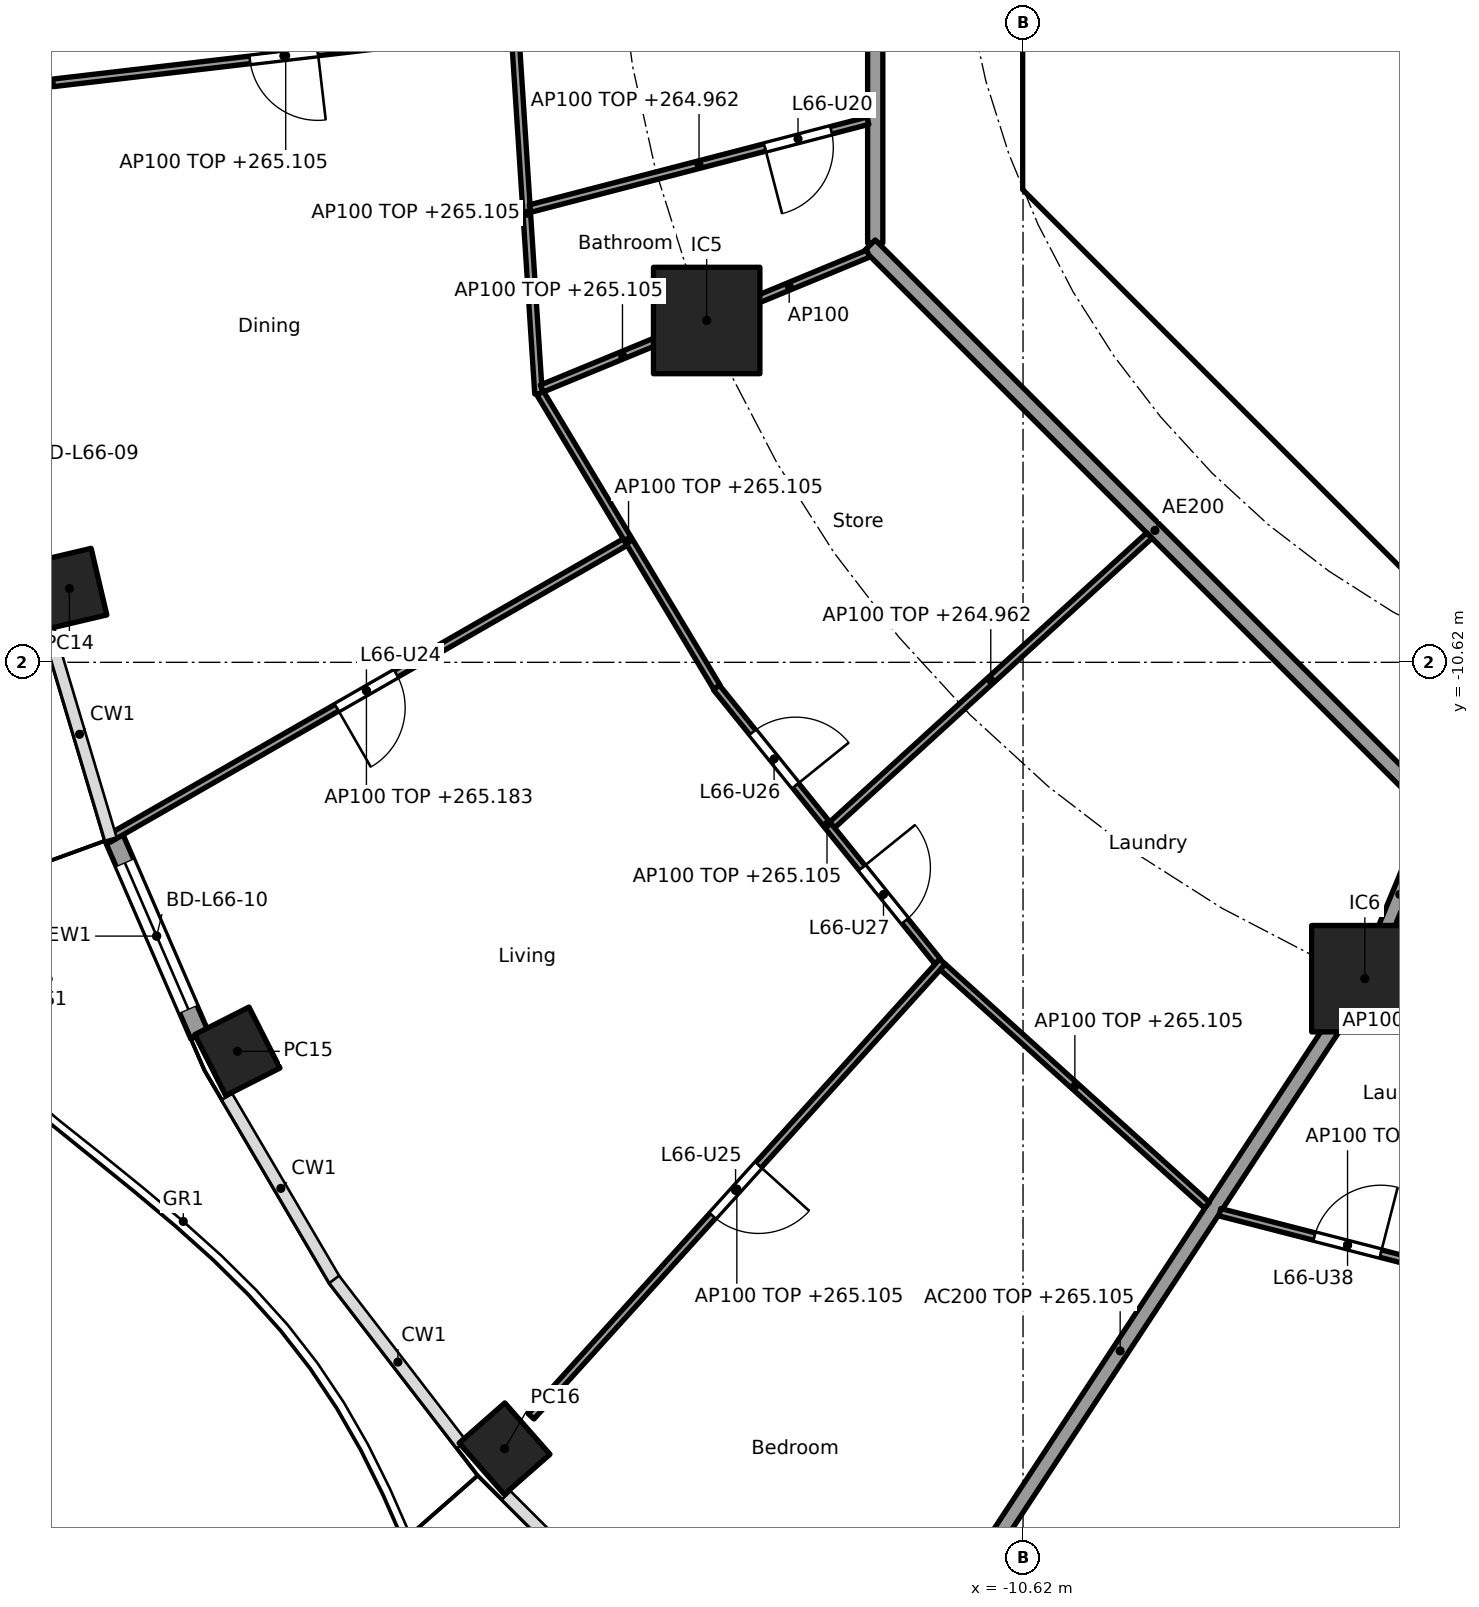
"""IFC4 building model, lengths in metres.
Left out: names, types, materials, properties, quantities, classifications, styles, units other than length and angle.
Written with IfcOpenShell. Run it as: python <this file> out.ifc"""

import sys

from ifc_helpers import new_model, si_unit, direction, frame, frame_2d, origin, origin_2d, place, context, subcontext, project, spatial, polyline, rectangle, hollow_rectangle, outline, extrude, element, fill, save


model = new_model("IFC4")
c1 = context("Model", 3, precision=1e-05, world=origin(), true_north=direction((0.0, 1.0)))
c2 = subcontext(c1, "Body", "Model", "MODEL_VIEW")
j1 = project(units=[si_unit("LENGTHUNIT", "METRE"), si_unit("PLANEANGLEUNIT", "RADIAN")], contexts=[c1])
p1 = place(None, origin())
s1 = spatial("IfcSite", under=j1, at=p1, CompositionType="ELEMENT")
p2 = place(p1, origin())
s2 = spatial("IfcBuilding", under=s1, at=p2, CompositionType="ELEMENT")
p3 = place(p2, frame((0.0, 0.0, 262.2)))
s3 = spatial("IfcBuildingStorey", under=s2, at=p3, CompositionType="ELEMENT", Elevation=262.2)
for number, where, z_axis, x_axis in (
    (1, (-23.166, -9.65, 0.0), (0.0, 0.0, 1.0), (0.229, -0.973, 0.0)),
    (2, (-20.957, -15.738, 0.0), (0.0, 0.0, 1.0), (0.452, -0.892, 0.0)),
    (3, (-17.441, -20.965, 0.0), (0.0, 0.0, 1.0), (0.66, -0.751, 0.0)),
):
    element("IfcColumn", number, at=place(p3, frame(where, z_axis=z_axis, x_axis=x_axis)), inside=s3, PredefinedType="COLUMN", context=c2, shape_type="SweptSolid", body=[
        extrude(hollow_rectangle(XDim=0.9, YDim=0.8, WallThickness=0.028, at=origin_2d()), origin(), (0.0, 0.0, 1.0), 3.7),
    ])
for number, where, z_axis, x_axis in (
    (4, (-14.782, -6.123, 0.0), (0.0, 0.0, 1.0), (1.0, 0.0, 0.0)),
    (5, (-6.123, -14.782, 0.0), (0.0, 0.0, 1.0), (1.0, 0.0, 0.0)),
):
    element("IfcColumn", number, at=place(p3, frame(where, z_axis=z_axis, x_axis=x_axis)), inside=s3, PredefinedType="COLUMN", context=c2, shape_type="SweptSolid", body=[
        extrude(rectangle(XDim=1.4, YDim=1.4, at=origin_2d()), origin(), (0.0, 0.0, 1.0), 3.7),
    ])
p4 = place(p3, frame((-21.454, -15.525, 0.0), z_axis=(0.0, 0.0, 1.0), x_axis=(-0.397597791596, 0.9175598052, 0.0)))
e6 = element("IfcWall", 6, at=p4, inside=s3, PredefinedType="SOLIDWALL", context=c2, shape_type="SweptSolid", body=[
    extrude(rectangle(XDim=2.841, YDim=0.25, at=frame_2d((1.42, 0.0))), origin(), (0.0, 0.0, 1.0), 3.44),
])
p5 = place(p4, frame((0.371, 0.0, 0.0)))
e7 = element("IfcOpeningElement", 7, at=p5, cuts=e6, PredefinedType="OPENING", context=c2, shape_type="SweptSolid", body=[
    extrude(rectangle(XDim=2.1, YDim=2.4, at=frame_2d((1.05, 1.2))), frame((0.0, 0.135, 0.0), z_axis=(0.0, -1.0, 0.0), x_axis=(1.0, 0.0, 0.0)), (0.0, 0.0, 1.0), 0.27),
])
p6 = place(p3, frame((-10.325, 3.801, 0.0), z_axis=(0.0, 0.0, 1.0), x_axis=(0.0, -1.0, 0.0)))
e8 = element("IfcWall", 8, at=p6, inside=s3, PredefinedType="SHEAR", context=c2, shape_type="SweptSolid", body=[
    extrude(rectangle(XDim=7.602, YDim=0.6, at=frame_2d((3.801, 0.0))), origin(), (0.0, 0.0, 1.0), 3.44),
])
p7 = place(p6, frame((0.651, 0.0, 0.0)))
e9 = element("IfcOpeningElement", 9, at=p7, cuts=e8, PredefinedType="OPENING", context=c2, shape_type="SweptSolid", body=[
    extrude(rectangle(XDim=1.5, YDim=2.1, at=frame_2d((0.75, 1.05))), frame((0.0, 0.31, 0.0), z_axis=(0.0, -1.0, 0.0), x_axis=(1.0, 0.0, 0.0)), (0.0, 0.0, 1.0), 0.62),
])
p8 = place(p6, frame((5.451, 0.0, 0.0)))
e10 = element("IfcOpeningElement", 10, at=p8, cuts=e8, PredefinedType="OPENING", context=c2, shape_type="SweptSolid", body=[
    extrude(rectangle(XDim=1.5, YDim=2.1, at=frame_2d((0.75, 1.05))), frame((0.0, 0.31, 0.0), z_axis=(0.0, -1.0, 0.0), x_axis=(1.0, 0.0, 0.0)), (0.0, 0.0, 1.0), 0.62),
])
p9 = place(p3, frame((-9.988, -4.613, 0.0), z_axis=(0.0, 0.0, 1.0), x_axis=(0.707106781187, -0.707106781187, 0.0)))
e11 = element("IfcWall", 11, at=p9, inside=s3, PredefinedType="SHEAR", context=c2, shape_type="SweptSolid", body=[
    extrude(rectangle(XDim=7.602, YDim=0.6, at=frame_2d((3.801, 0.0))), origin(), (0.0, 0.0, 1.0), 3.44),
])
p10 = place(p9, frame((6.151, 0.0, 0.0)))
e12 = element("IfcOpeningElement", 12, at=p10, cuts=e11, PredefinedType="OPENING", context=c2, shape_type="SweptSolid", body=[
    extrude(rectangle(XDim=1.1, YDim=2.1, at=frame_2d((0.55, 1.05))), frame((0.0, 0.31, 0.0), z_axis=(0.0, -1.0, 0.0), x_axis=(1.0, 0.0, 0.0)), (0.0, 0.0, 1.0), 0.62),
])
p11 = place(p3, frame((-6.6, -7.427, 0.0), z_axis=(0.0, 0.0, 1.0), x_axis=(0.0, 1.0, 0.0)))
e13 = element("IfcWall", 13, at=p11, inside=s3, PredefinedType="PARTITIONING", context=c2, shape_type="SweptSolid", body=[
    extrude(rectangle(XDim=3.127, YDim=0.15, at=frame_2d((1.563, 0.0))), origin(), (0.0, 0.0, 1.0), 3.44),
])
p12 = place(p11, frame((1.076, 0.0, 0.0)))
e14 = element("IfcOpeningElement", 14, at=p12, cuts=e13, PredefinedType="OPENING", context=c2, shape_type="SweptSolid", body=[
    extrude(rectangle(XDim=0.9, YDim=2.1, at=frame_2d((0.45, 1.05))), frame((0.0, 0.085, 0.0), z_axis=(0.0, -1.0, 0.0), x_axis=(1.0, 0.0, 0.0)), (0.0, 0.0, 1.0), 0.17),
])
p13 = place(p3, origin())
e15 = element("IfcWall", 15, at=p13, inside=s3, PredefinedType="SHEAR", context=c2, shape_type="SweptSolid", body=[
    extrude(outline(polyline([(-10.625, -3.801), (-10.025, -3.801), (-10.025, -4.152), (-9.776, -4.401), (-10.2, -4.825), (-10.625, -4.401), (-10.625, -3.801)])), origin(), (0.0, 0.0, 1.0), 3.44),
])
p14 = place(p3, origin())
e16 = element("IfcWall", 16, at=p14, inside=s3, PredefinedType="SOLIDWALL", context=c2, shape_type="SweptSolid", body=[
    extrude(outline(polyline([(-6.7, -2.1), (-6.5, -2.1), (-6.5, -4.1), (-2.3, -4.1), (-2.3, -2.1), (-2.1, -2.1), (-2.1, -4.1), (2.1, -4.1), (2.1, -2.1), (2.3, -2.1), (2.3, -4.1), (4.3, -4.1), (4.3, -2.1), (4.5, -2.1), (4.5, -4.1), (6.5, -4.1), (6.5, -2.1), (6.7, -2.1), (6.7, -4.3), (-6.7, -4.3), (-6.7, -2.1)])), origin(), (0.0, 0.0, 1.0), 3.44),
])
p15 = place(p3, frame((-10.025, -4.0, 0.0), z_axis=(0.0, 0.0, 1.0), x_axis=(1.0, 0.0, 0.0)))
e17 = element("IfcWall", 17, at=p15, inside=s3, PredefinedType="PARTITIONING", context=c2, shape_type="SweptSolid", body=[
    extrude(rectangle(XDim=3.325, YDim=0.2, at=frame_2d((1.662, 0.0))), origin(), (0.0, 0.0, 1.0), 3.44),
])
p16 = place(p3, frame((-5.243, -12.657, 0.0), z_axis=(0.0, 0.0, 1.0), x_axis=(-0.382770106157, -0.923843626288, 0.0)))
e18 = element("IfcWall", 18, at=p16, inside=s3, PredefinedType="PARTITIONING", context=c2, shape_type="SweptSolid", body=[
    extrude(rectangle(XDim=2.199, YDim=0.2, at=frame_2d((1.1, 0.0))), origin(), (0.0, 0.0, 1.0), 3.44),
])
p17 = place(p3, frame((-6.151, -14.824, 0.0), z_axis=(0.0, 0.0, 1.0), x_axis=(-0.549345577828, -0.835595258556, 0.0)))
e19 = element("IfcWall", 19, at=p17, inside=s3, PredefinedType="PARTITIONING", context=c2, shape_type="SweptSolid", body=[
    extrude(rectangle(XDim=11.62, YDim=0.2, at=frame_2d((5.81, 0.0))), origin(), (0.0, 0.0, 1.0), 2.905),
])
p18 = place(p3, frame((-12.565, 5.304, 0.0), z_axis=(0.0, 0.0, 1.0), x_axis=(0.0, -1.0, 0.0)))
e20 = element("IfcWall", 20, at=p18, inside=s3, PredefinedType="PARTITIONING", context=c2, shape_type="SweptSolid", body=[
    extrude(rectangle(XDim=10.409, YDim=0.2, at=frame_2d((5.205, 0.0))), origin(), (0.0, 0.0, 1.0), 3.44),
])
p19 = place(p18, frame((6.539, 0.0, 0.0)))
e21 = element("IfcOpeningElement", 21, at=p19, cuts=e20, PredefinedType="OPENING", context=c2, shape_type="SweptSolid", body=[
    extrude(rectangle(XDim=1.0, YDim=2.1, at=frame_2d((0.5, 1.05))), frame((0.0, 0.11, 0.0), z_axis=(0.0, -1.0, 0.0), x_axis=(1.0, 0.0, 0.0)), (0.0, 0.0, 1.0), 0.22),
])
p20 = place(p3, frame((-12.635, -5.134, 0.0), z_axis=(0.0, 0.0, 1.0), x_axis=(0.707106781187, -0.707106781187, 0.0)))
e22 = element("IfcWall", 22, at=p20, inside=s3, PredefinedType="PARTITIONING", context=c2, shape_type="SweptSolid", body=[
    extrude(rectangle(XDim=10.609, YDim=0.2, at=frame_2d((5.305, 0.0))), origin(), (0.0, 0.0, 1.0), 3.44),
])
p21 = place(p3, frame((-17.257, -2.282, 0.0), z_axis=(0.0, 0.0, 1.0), x_axis=(-0.993266024162, -0.11585596767, 0.0)))
e23 = element("IfcWall", 23, at=p21, inside=s3, PredefinedType="PARTITIONING", context=c2, shape_type="SweptSolid", body=[
    extrude(rectangle(XDim=6.168, YDim=0.1, at=frame_2d((3.084, 0.0))), origin(), (0.0, 0.0, 1.0), 2.905),
])
p22 = place(p21, frame((2.659, 0.0, 0.0)))
e24 = element("IfcOpeningElement", 24, at=p22, cuts=e23, PredefinedType="OPENING", context=c2, shape_type="SweptSolid", body=[
    extrude(rectangle(XDim=0.9, YDim=2.1, at=frame_2d((0.45, 1.05))), frame((0.0, 0.06, 0.0), z_axis=(0.0, -1.0, 0.0), x_axis=(1.0, 0.0, 0.0)), (0.0, 0.0, 1.0), 0.12),
])
p23 = place(p3, frame((-17.304, -2.338, 0.0), z_axis=(0.0, 0.0, 1.0), x_axis=(0.065003615989, -0.997885028402, 0.0)))
e25 = element("IfcWall", 25, at=p23, inside=s3, PredefinedType="PARTITIONING", context=c2, shape_type="SweptSolid", body=[
    extrude(rectangle(XDim=4.759, YDim=0.1, at=frame_2d((2.379, 0.0))), origin(), (0.0, 0.0, 1.0), 2.905),
])
p24 = place(p3, frame((-12.662, -3.495, 0.0), z_axis=(0.0, 0.0, 1.0), x_axis=(-0.967834941053, -0.251586022817, 0.0)))
e26 = element("IfcWall", 26, at=p24, inside=s3, PredefinedType="PARTITIONING", context=c2, shape_type="SweptSolid", body=[
    extrude(rectangle(XDim=4.59, YDim=0.1, at=frame_2d((2.295, 0.0))), origin(), (0.0, 0.0, 1.0), 2.762),
])
p25 = place(p24, frame((0.5, 0.0, 0.0)))
e27 = element("IfcOpeningElement", 27, at=p25, cuts=e26, PredefinedType="OPENING", context=c2, shape_type="SweptSolid", body=[
    extrude(rectangle(XDim=0.9, YDim=2.1, at=frame_2d((0.45, 1.05))), frame((0.0, 0.06, 0.0), z_axis=(0.0, -1.0, 0.0), x_axis=(1.0, 0.0, 0.0)), (0.0, 0.0, 1.0), 0.12),
])
p26 = place(p3, frame((-12.657, -5.243, 0.0), z_axis=(0.0, 0.0, 1.0), x_axis=(-0.923864733477, -0.382719158442, 0.0)))
e28 = element("IfcWall", 28, at=p26, inside=s3, PredefinedType="PARTITIONING", context=c2, shape_type="SweptSolid", body=[
    extrude(rectangle(XDim=2.25, YDim=0.1, at=frame_2d((1.125, 0.0))), origin(), (0.0, 0.0, 1.0), 3.44),
])
p27 = place(p3, frame((-14.828, -6.142, 0.0), z_axis=(0.0, 0.0, 1.0), x_axis=(-0.924479819749, -0.381230983627, 0.0)))
e29 = element("IfcWall", 29, at=p27, inside=s3, PredefinedType="PARTITIONING", context=c2, shape_type="SweptSolid", body=[
    extrude(rectangle(XDim=2.296, YDim=0.1, at=frame_2d((1.148, 0.0))), origin(), (0.0, 0.0, 1.0), 2.905),
])
p28 = place(p3, frame((-16.972, -7.08, 0.0), z_axis=(0.0, 0.0, 1.0), x_axis=(0.514989049311, -0.857196756346, 0.0)))
e30 = element("IfcWall", 30, at=p28, inside=s3, PredefinedType="PARTITIONING", context=c2, shape_type="SweptSolid", body=[
    extrude(rectangle(XDim=4.512, YDim=0.1, at=frame_2d((2.256, 0.0))), origin(), (0.0, 0.0, 1.0), 2.905),
])
p29 = place(p3, frame((-15.854, -9.038, 0.0), z_axis=(0.0, 0.0, 1.0), x_axis=(-0.867229230904, -0.497909089157, 0.0)))
e31 = element("IfcWall", 31, at=p29, inside=s3, PredefinedType="PARTITIONING", context=c2, shape_type="SweptSolid", body=[
    extrude(rectangle(XDim=7.853, YDim=0.1, at=frame_2d((3.926, 0.0))), origin(), (0.0, 0.0, 1.0), 2.983),
])
p30 = place(p29, frame((3.476, 0.0, 0.0)))
e32 = element("IfcOpeningElement", 32, at=p30, cuts=e31, PredefinedType="OPENING", context=c2, shape_type="SweptSolid", body=[
    extrude(rectangle(XDim=0.9, YDim=2.1, at=frame_2d((0.45, 1.05))), frame((0.0, 0.06, 0.0), z_axis=(0.0, -1.0, 0.0), x_axis=(1.0, 0.0, 0.0)), (0.0, 0.0, 1.0), 0.12),
])
p31 = place(p3, frame((-14.654, -10.951, 0.0), z_axis=(0.0, 0.0, 1.0), x_axis=(0.62815308134, -0.778089780426, 0.0)))
e33 = element("IfcWall", 33, at=p31, inside=s3, PredefinedType="PARTITIONING", context=c2, shape_type="SweptSolid", body=[
    extrude(rectangle(XDim=4.633, YDim=0.1, at=frame_2d((2.316, 0.0))), origin(), (0.0, 0.0, 1.0), 2.905),
])
p32 = place(p31, frame((0.758, 0.0, 0.0)))
e34 = element("IfcOpeningElement", 34, at=p32, cuts=e33, PredefinedType="OPENING", context=c2, shape_type="SweptSolid", body=[
    extrude(rectangle(XDim=0.9, YDim=2.1, at=frame_2d((0.45, 1.05))), frame((0.0, 0.06, 0.0), z_axis=(0.0, -1.0, 0.0), x_axis=(1.0, 0.0, 0.0)), (0.0, 0.0, 1.0), 0.12),
])
p33 = place(p31, frame((3.049, 0.0, 0.0)))
e35 = element("IfcOpeningElement", 35, at=p33, cuts=e33, PredefinedType="OPENING", context=c2, shape_type="SweptSolid", body=[
    extrude(rectangle(XDim=0.9, YDim=2.1, at=frame_2d((0.45, 1.05))), frame((0.0, 0.06, 0.0), z_axis=(0.0, -1.0, 0.0), x_axis=(1.0, 0.0, 0.0)), (0.0, 0.0, 1.0), 0.12),
])
p34 = place(p3, frame((-8.958, -8.952, 0.0), z_axis=(0.0, 0.0, 1.0), x_axis=(-0.73876526954, -0.673962815385, 0.0)))
e36 = element("IfcWall", 36, at=p34, inside=s3, PredefinedType="PARTITIONING", context=c2, shape_type="SweptSolid", body=[
    extrude(rectangle(XDim=5.647, YDim=0.1, at=frame_2d((2.824, 0.0))), origin(), (0.0, 0.0, 1.0), 2.762),
])
p35 = place(p3, frame((-11.679, -14.557, 0.0), z_axis=(0.0, 0.0, 1.0), x_axis=(-0.670800011545, -0.741638284146, 0.0)))
e37 = element("IfcWall", 37, at=p35, inside=s3, PredefinedType="PARTITIONING", context=c2, shape_type="SweptSolid", body=[
    extrude(rectangle(XDim=8.068, YDim=0.1, at=frame_2d((4.034, 0.0))), origin(), (0.0, 0.0, 1.0), 2.905),
])
p36 = place(p35, frame((3.609, 0.0, 0.0)))
e38 = element("IfcOpeningElement", 38, at=p36, cuts=e37, PredefinedType="OPENING", context=c2, shape_type="SweptSolid", body=[
    extrude(rectangle(XDim=0.9, YDim=2.1, at=frame_2d((0.45, 1.05))), frame((0.0, 0.06, 0.0), z_axis=(0.0, -1.0, 0.0), x_axis=(1.0, 0.0, 0.0)), (0.0, 0.0, 1.0), 0.12),
])
p37 = place(p3, frame((-11.676, -14.628, 0.0), z_axis=(0.0, 0.0, 1.0), x_axis=(0.74245829867, -0.669892285921, 0.0)))
e39 = element("IfcWall", 39, at=p37, inside=s3, PredefinedType="PARTITIONING", context=c2, shape_type="SweptSolid", body=[
    extrude(rectangle(XDim=4.68, YDim=0.1, at=frame_2d((2.34, 0.0))), origin(), (0.0, 0.0, 1.0), 2.905),
])
p38 = place(p3, frame((-8.03, -17.854, 0.0), z_axis=(0.0, 0.0, 1.0), x_axis=(0.968441967324, -0.249239154077, 0.0)))
e40 = element("IfcWall", 40, at=p38, inside=s3, PredefinedType="PARTITIONING", context=c2, shape_type="SweptSolid", body=[
    extrude(rectangle(XDim=3.468, YDim=0.1, at=frame_2d((1.734, 0.0))), origin(), (0.0, 0.0, 1.0), 2.905),
])
p39 = place(p38, frame((1.284, 0.0, 0.0)))
e41 = element("IfcOpeningElement", 41, at=p39, cuts=e40, PredefinedType="OPENING", context=c2, shape_type="SweptSolid", body=[
    extrude(rectangle(XDim=0.9, YDim=2.1, at=frame_2d((0.45, 1.05))), frame((0.0, 0.06, 0.0), z_axis=(0.0, -1.0, 0.0), x_axis=(1.0, 0.0, 0.0)), (0.0, 0.0, 1.0), 0.12),
])
p40 = place(p5, origin())
e42 = element("IfcDoor", 42, at=p40, inside=s3, OperationType="SLIDING_TO_LEFT", PredefinedType="DOOR", context=c2, shape_type="SweptSolid", body=[
    extrude(rectangle(XDim=2.1, YDim=2.4, at=frame_2d((1.05, 1.2))), frame((0.0, 0.025, 0.0), z_axis=(0.0, -1.0, 0.0), x_axis=(1.0, 0.0, 0.0)), (0.0, 0.0, 1.0), 0.05),
])
fill(e7, e42)
p41 = place(p12, origin())
e43 = element("IfcDoor", 43, at=p41, inside=s3, OperationType="SINGLE_SWING_LEFT", PredefinedType="DOOR", context=c2, shape_type="SweptSolid", body=[
    extrude(rectangle(XDim=0.9, YDim=2.1, at=frame_2d((0.45, 1.05))), frame((0.0, 0.025, 0.0), z_axis=(0.0, -1.0, 0.0), x_axis=(1.0, 0.0, 0.0)), (0.0, 0.0, 1.0), 0.05),
])
fill(e14, e43)
p42 = place(p8, origin())
e44 = element("IfcDoor", 44, at=p42, inside=s3, OperationType="DOUBLE_DOOR_SINGLE_SWING", PredefinedType="DOOR", context=c2, shape_type="SweptSolid", body=[
    extrude(rectangle(XDim=1.5, YDim=2.1, at=frame_2d((0.75, 1.05))), frame((0.0, 0.025, 0.0), z_axis=(0.0, -1.0, 0.0), x_axis=(1.0, 0.0, 0.0)), (0.0, 0.0, 1.0), 0.05),
])
fill(e10, e44)
p43 = place(p25, origin())
e45 = element("IfcDoor", 45, at=p43, inside=s3, OperationType="SINGLE_SWING_RIGHT", PredefinedType="DOOR", context=c2, shape_type="SweptSolid", body=[
    extrude(rectangle(XDim=0.9, YDim=2.1, at=frame_2d((0.45, 1.05))), frame((0.0, 0.025, 0.0), z_axis=(0.0, -1.0, 0.0), x_axis=(1.0, 0.0, 0.0)), (0.0, 0.0, 1.0), 0.05),
])
fill(e27, e45)
p44 = place(p22, origin())
e46 = element("IfcDoor", 46, at=p44, inside=s3, OperationType="SINGLE_SWING_LEFT", PredefinedType="DOOR", context=c2, shape_type="SweptSolid", body=[
    extrude(rectangle(XDim=0.9, YDim=2.1, at=frame_2d((0.45, 1.05))), frame((0.0, 0.025, 0.0), z_axis=(0.0, -1.0, 0.0), x_axis=(1.0, 0.0, 0.0)), (0.0, 0.0, 1.0), 0.05),
])
fill(e24, e46)
p45 = place(p30, origin())
e47 = element("IfcDoor", 47, at=p45, inside=s3, OperationType="SINGLE_SWING_RIGHT", PredefinedType="DOOR", context=c2, shape_type="SweptSolid", body=[
    extrude(rectangle(XDim=0.9, YDim=2.1, at=frame_2d((0.45, 1.05))), frame((0.0, 0.025, 0.0), z_axis=(0.0, -1.0, 0.0), x_axis=(1.0, 0.0, 0.0)), (0.0, 0.0, 1.0), 0.05),
])
fill(e32, e47)
p46 = place(p36, origin())
e48 = element("IfcDoor", 48, at=p46, inside=s3, OperationType="SINGLE_SWING_LEFT", PredefinedType="DOOR", context=c2, shape_type="SweptSolid", body=[
    extrude(rectangle(XDim=0.9, YDim=2.1, at=frame_2d((0.45, 1.05))), frame((0.0, 0.025, 0.0), z_axis=(0.0, -1.0, 0.0), x_axis=(1.0, 0.0, 0.0)), (0.0, 0.0, 1.0), 0.05),
])
fill(e38, e48)
p47 = place(p32, origin())
e49 = element("IfcDoor", 49, at=p47, inside=s3, OperationType="SINGLE_SWING_RIGHT", PredefinedType="DOOR", context=c2, shape_type="SweptSolid", body=[
    extrude(rectangle(XDim=0.9, YDim=2.1, at=frame_2d((0.45, 1.05))), frame((0.0, 0.025, 0.0), z_axis=(0.0, -1.0, 0.0), x_axis=(1.0, 0.0, 0.0)), (0.0, 0.0, 1.0), 0.05),
])
fill(e34, e49)
p48 = place(p33, origin())
e50 = element("IfcDoor", 50, at=p48, inside=s3, OperationType="SINGLE_SWING_LEFT", PredefinedType="DOOR", context=c2, shape_type="SweptSolid", body=[
    extrude(rectangle(XDim=0.9, YDim=2.1, at=frame_2d((0.45, 1.05))), frame((0.0, 0.025, 0.0), z_axis=(0.0, -1.0, 0.0), x_axis=(1.0, 0.0, 0.0)), (0.0, 0.0, 1.0), 0.05),
])
fill(e35, e50)
p49 = place(p39, origin())
e51 = element("IfcDoor", 51, at=p49, inside=s3, OperationType="SINGLE_SWING_RIGHT", PredefinedType="DOOR", context=c2, shape_type="SweptSolid", body=[
    extrude(rectangle(XDim=0.9, YDim=2.1, at=frame_2d((0.45, 1.05))), frame((0.0, 0.025, 0.0), z_axis=(0.0, -1.0, 0.0), x_axis=(1.0, 0.0, 0.0)), (0.0, 0.0, 1.0), 0.05),
])
fill(e41, e51)
save(model, sys.argv[1])
